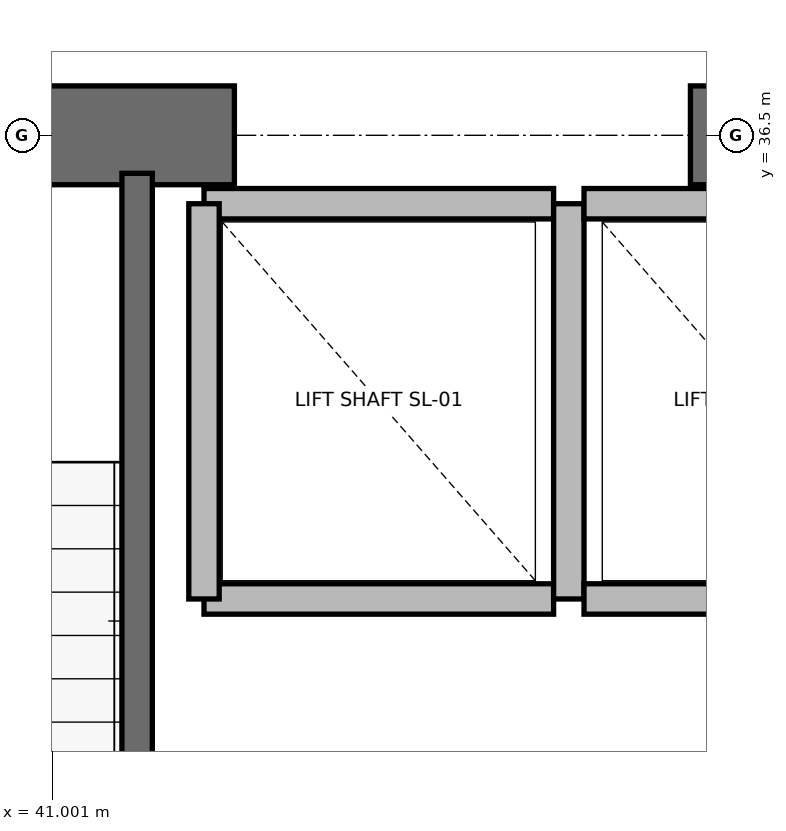
"""IFC4 building model, lengths in metres.
Left out: names, types, materials, properties, quantities, classifications, styles, units other than length and angle.
Written with IfcOpenShell. Run it as: python <this file> out.ifc"""

import sys

from ifc_helpers import new_model, si_unit, direction, frame, frame_2d, origin, place, context, subcontext, project, spatial, rectangle, extrude, element, save


model = new_model("IFC4")
c1 = context("Model", 3, precision=1e-05, world=origin(), true_north=direction((0.0, 1.0)))
c2 = subcontext(c1, "Body", "Model", "MODEL_VIEW")
j1 = project(units=[si_unit("LENGTHUNIT", "METRE"), si_unit("PLANEANGLEUNIT", "RADIAN")], contexts=[c1])
p1 = place(None, origin())
s1 = spatial("IfcSite", under=j1, at=p1, CompositionType="ELEMENT")
p2 = place(p1, origin())
s2 = spatial("IfcBuilding", under=s1, at=p2, CompositionType="ELEMENT")
p3 = place(p2, frame((0.0, 0.0, 59.6)))
s3 = spatial("IfcBuildingStorey", under=s2, at=p3, CompositionType="ELEMENT", Elevation=59.6)
p4 = place(p3, frame((37.8, 36.5, 0.0), z_axis=(0.0, 0.0, 1.0), x_axis=(1.0, 0.0, 0.0)))
e1 = element("IfcWall", 1, at=p4, inside=s3, PredefinedType="SHEAR", context=c2, shape_type="SweptSolid", body=[
    extrude(rectangle(XDim=4.4, YDim=0.65, at=frame_2d((2.2, 0.0))), origin(), (0.0, 0.0, 1.0), 3.76),
])
p5 = place(p4, frame((1.65, 0.0, 0.0)))
e2 = element("IfcOpeningElement", 2, at=p5, cuts=e1, PredefinedType="OPENING", context=c2, shape_type="SweptSolid", body=[
    extrude(rectangle(XDim=1.1, YDim=2.15, at=frame_2d((0.55, 1.075))), frame((0.0, 0.325, 0.0), z_axis=(0.0, -1.0, 0.0), x_axis=(1.0, 0.0, 0.0)), (0.0, 0.0, 1.0), 0.65),
])
p6 = place(p3, frame((45.2, 36.5, 0.0), z_axis=(0.0, 0.0, 1.0), x_axis=(1.0, 0.0, 0.0)))
e3 = element("IfcWall", 3, at=p6, inside=s3, PredefinedType="SHEAR", context=c2, shape_type="SweptSolid", body=[
    extrude(rectangle(XDim=5.8, YDim=0.65, at=frame_2d((2.9, 0.0))), origin(), (0.0, 0.0, 1.0), 3.76),
])
p7 = place(p3, frame((41.56, 27.68, 0.0), z_axis=(0.0, 0.0, 1.0), x_axis=(0.0, 1.0, 0.0)))
e4 = element("IfcWall", 4, at=p7, inside=s3, PredefinedType="SOLIDWALL", context=c2, shape_type="SweptSolid", body=[
    extrude(rectangle(XDim=8.57, YDim=0.2, at=frame_2d((4.285, 0.0))), origin(), (0.0, 0.0, 1.0), 3.76),
])
p8 = place(p3, frame((42.0, 33.45, 0.0), z_axis=(0.0, 0.0, 1.0), x_axis=(1.0, 0.0, 0.0)))
e5 = element("IfcWall", 5, at=p8, inside=s3, PredefinedType="SOLIDWALL", context=c2, shape_type="SweptSolid", body=[
    extrude(rectangle(XDim=2.3, YDim=0.2, at=frame_2d((1.15, 0.0))), origin(), (0.0, 0.0, 1.0), 3.76),
])
p9 = place(p3, frame((44.3, 36.05, 0.0), z_axis=(0.0, 0.0, 1.0), x_axis=(-1.0, 0.0, 0.0)))
e6 = element("IfcWall", 6, at=p9, inside=s3, PredefinedType="SOLIDWALL", context=c2, shape_type="SweptSolid", body=[
    extrude(rectangle(XDim=2.3, YDim=0.2, at=frame_2d((1.15, 0.0))), origin(), (0.0, 0.0, 1.0), 2.54),
])
for number, where, z_axis, x_axis in (
    (7, (42.0, 36.05, 0.0), (0.0, 0.0, 1.0), (0.0, -1.0, 0.0)),
    (8, (44.4, 33.45, 0.0), (0.0, 0.0, 1.0), (0.0, 1.0, 0.0)),
):
    element("IfcWall", number, at=place(p3, frame(where, z_axis=z_axis, x_axis=x_axis)), inside=s3, PredefinedType="SOLIDWALL", context=c2, shape_type="SweptSolid", body=[
        extrude(rectangle(XDim=2.6, YDim=0.2, at=frame_2d((1.3, 0.0))), origin(), (0.0, 0.0, 1.0), 2.54),
    ])
p10 = place(p3, frame((44.5, 33.45, 0.0), z_axis=(0.0, 0.0, 1.0), x_axis=(1.0, 0.0, 0.0)))
e9 = element("IfcWall", 9, at=p10, inside=s3, PredefinedType="SOLIDWALL", context=c2, shape_type="SweptSolid", body=[
    extrude(rectangle(XDim=2.3, YDim=0.2, at=frame_2d((1.15, 0.0))), origin(), (0.0, 0.0, 1.0), 3.76),
])
p11 = place(p3, frame((46.8, 36.05, 0.0), z_axis=(0.0, 0.0, 1.0), x_axis=(-1.0, 0.0, 0.0)))
e10 = element("IfcWall", 10, at=p11, inside=s3, PredefinedType="SOLIDWALL", context=c2, shape_type="SweptSolid", body=[
    extrude(rectangle(XDim=2.3, YDim=0.2, at=frame_2d((1.15, 0.0))), origin(), (0.0, 0.0, 1.0), 2.54),
])
save(model, sys.argv[1])
